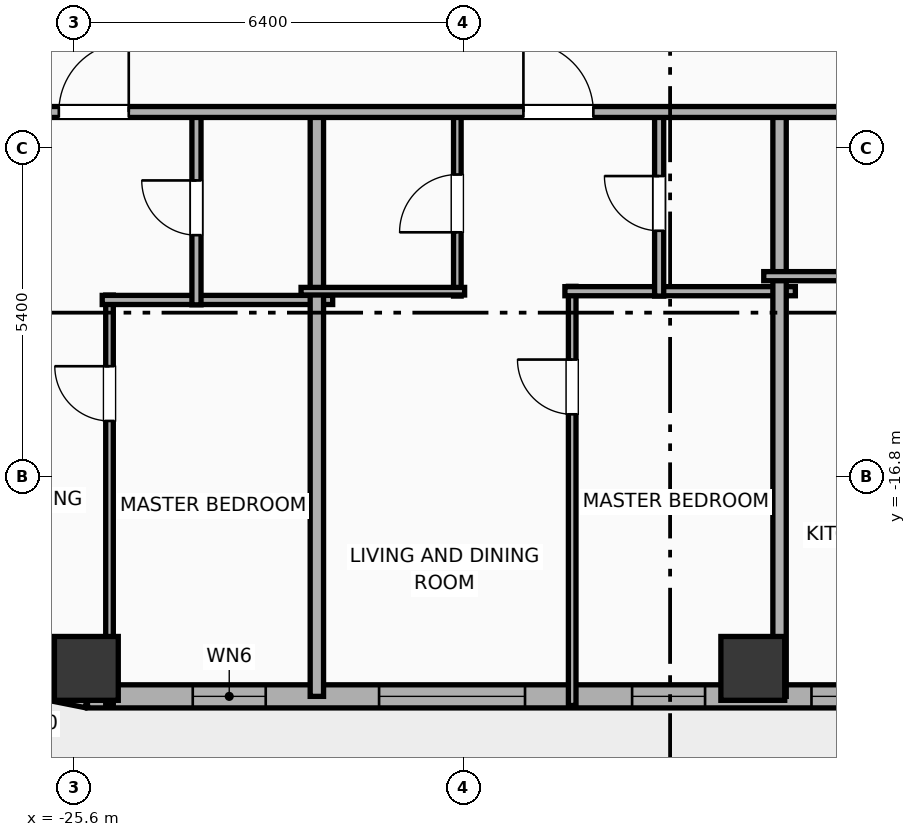
"""IFC4 building model, lengths in metres.
Left out: names, types, materials, properties, quantities, classifications, styles, units other than length and angle.
Written with IfcOpenShell. Run it as: python <this file> out.ifc"""

import sys

from ifc_helpers import new_model, si_unit, direction, frame, frame_2d, origin, origin_2d, place, context, subcontext, project, spatial, rectangle, hollow_rectangle, extrude, element, fill, save


model = new_model("IFC4")
c1 = context("Model", 3, precision=1e-05, world=origin(), true_north=direction((0.0, 1.0)))
c2 = subcontext(c1, "Body", "Model", "MODEL_VIEW")
j1 = project(units=[si_unit("LENGTHUNIT", "METRE"), si_unit("PLANEANGLEUNIT", "RADIAN")], contexts=[c1])
p1 = place(None, origin())
s1 = spatial("IfcSite", under=j1, at=p1, CompositionType="ELEMENT")
p2 = place(p1, origin())
s2 = spatial("IfcBuilding", under=s1, at=p2, CompositionType="ELEMENT")
p3 = place(p2, frame((0.0, 0.0, 85.8)))
s3 = spatial("IfcBuildingStorey", under=s2, at=p3, CompositionType="ELEMENT", Elevation=85.8)
for number, where, z_axis, x_axis in (
    (1, (-25.4, -19.95, -0.4), (0.0, 0.0, 1.0), (1.0, 0.0, 0.0)),
    (2, (-14.44, -19.95, -0.4), (0.0, 0.0, 1.0), (1.0, 0.0, 0.0)),
):
    element("IfcColumn", number, at=place(p3, frame(where, z_axis=z_axis, x_axis=x_axis)), inside=s3, PredefinedType="COLUMN", context=c2, shape_type="SweptSolid", body=[
        extrude(hollow_rectangle(XDim=1.05, YDim=1.05, WallThickness=0.036, at=origin_2d()), origin(), (0.0, 0.0, 1.0), 4.3),
    ])
p4 = place(p3, frame((29.381, -20.41, 0.0), z_axis=(0.0, 0.0, 1.0), x_axis=(-1.0, 0.0, 0.0)))
e3 = element("IfcWall", 3, at=p4, inside=s3, PredefinedType="ELEMENTEDWALL", context=c2, shape_type="SweptSolid", body=[
    extrude(rectangle(XDim=54.763, YDim=0.38, at=frame_2d((27.381, 0.0))), origin(), (0.0, 0.0, 1.0), 2.54),
])
p5 = place(p4, frame((18.486, 0.0, 0.75)))
e4 = element("IfcOpeningElement", 4, at=p5, cuts=e3, PredefinedType="OPENING", context=c2, shape_type="SweptSolid", body=[
    extrude(rectangle(XDim=2.4, YDim=1.45, at=frame_2d((1.2, 0.725))), frame((0.0, 0.2, 0.0), z_axis=(0.0, -1.0, 0.0), x_axis=(1.0, 0.0, 0.0)), (0.0, 0.0, 1.0), 0.4),
])
p6 = place(p4, frame((47.567, 0.0, 0.75)))
e5 = element("IfcOpeningElement", 5, at=p6, cuts=e3, PredefinedType="OPENING", context=c2, shape_type="SweptSolid", body=[
    extrude(rectangle(XDim=2.4, YDim=1.45, at=frame_2d((1.2, 0.725))), frame((0.0, 0.2, 0.0), z_axis=(0.0, -1.0, 0.0), x_axis=(1.0, 0.0, 0.0)), (0.0, 0.0, 1.0), 0.4),
])
p7 = place(p4, frame((7.464, 0.0, 0.0)))
e6 = element("IfcOpeningElement", 6, at=p7, cuts=e3, PredefinedType="OPENING", context=c2, shape_type="SweptSolid", body=[
    extrude(rectangle(XDim=1.5, YDim=2.05, at=frame_2d((0.75, 1.025))), frame((0.0, 0.2, 0.0), z_axis=(0.0, -1.0, 0.0), x_axis=(1.0, 0.0, 0.0)), (0.0, 0.0, 1.0), 0.4),
])
p8 = place(p4, frame((51.831, 0.0, 0.55)))
e7 = element("IfcOpeningElement", 7, at=p8, cuts=e3, PredefinedType="OPENING", context=c2, shape_type="SweptSolid", body=[
    extrude(rectangle(XDim=1.2, YDim=1.15, at=frame_2d((0.6, 0.575))), frame((0.0, 0.2, 0.0), z_axis=(0.0, -1.0, 0.0), x_axis=(1.0, 0.0, 0.0)), (0.0, 0.0, 1.0), 0.4),
])
p9 = place(p4, frame((44.606, 0.0, 0.55)))
e8 = element("IfcOpeningElement", 8, at=p9, cuts=e3, PredefinedType="OPENING", context=c2, shape_type="SweptSolid", body=[
    extrude(rectangle(XDim=1.2, YDim=1.15, at=frame_2d((0.6, 0.575))), frame((0.0, 0.2, 0.0), z_axis=(0.0, -1.0, 0.0), x_axis=(1.0, 0.0, 0.0)), (0.0, 0.0, 1.0), 0.4),
])
p10 = place(p4, frame((38.906, 0.0, 0.55)))
e9 = element("IfcOpeningElement", 9, at=p10, cuts=e3, PredefinedType="OPENING", context=c2, shape_type="SweptSolid", body=[
    extrude(rectangle(XDim=1.2, YDim=1.15, at=frame_2d((0.6, 0.575))), frame((0.0, 0.2, 0.0), z_axis=(0.0, -1.0, 0.0), x_axis=(1.0, 0.0, 0.0)), (0.0, 0.0, 1.0), 0.4),
])
p11 = place(p4, frame((41.656, 0.0, 0.55)))
e10 = element("IfcOpeningElement", 10, at=p11, cuts=e3, PredefinedType="OPENING", context=c2, shape_type="SweptSolid", body=[
    extrude(rectangle(XDim=1.2, YDim=1.15, at=frame_2d((0.6, 0.575))), frame((0.0, 0.2, 0.0), z_axis=(0.0, -1.0, 0.0), x_axis=(1.0, 0.0, 0.0)), (0.0, 0.0, 1.0), 0.4),
])
p12 = place(p4, frame((33.666, 0.0, 0.55)))
e11 = element("IfcOpeningElement", 11, at=p12, cuts=e3, PredefinedType="OPENING", context=c2, shape_type="SweptSolid", body=[
    extrude(rectangle(XDim=1.2, YDim=1.15, at=frame_2d((0.6, 0.575))), frame((0.0, 0.2, 0.0), z_axis=(0.0, -1.0, 0.0), x_axis=(1.0, 0.0, 0.0)), (0.0, 0.0, 1.0), 0.4),
])
p13 = place(p4, frame((36.176, 0.0, 0.55)))
e12 = element("IfcOpeningElement", 12, at=p13, cuts=e3, PredefinedType="OPENING", context=c2, shape_type="SweptSolid", body=[
    extrude(rectangle(XDim=1.2, YDim=1.15, at=frame_2d((0.6, 0.575))), frame((0.0, 0.2, 0.0), z_axis=(0.0, -1.0, 0.0), x_axis=(1.0, 0.0, 0.0)), (0.0, 0.0, 1.0), 0.4),
])
p14 = place(p4, frame((27.861, 0.0, 0.55)))
e13 = element("IfcOpeningElement", 13, at=p14, cuts=e3, PredefinedType="OPENING", context=c2, shape_type="SweptSolid", body=[
    extrude(rectangle(XDim=1.2, YDim=1.15, at=frame_2d((0.6, 0.575))), frame((0.0, 0.2, 0.0), z_axis=(0.0, -1.0, 0.0), x_axis=(1.0, 0.0, 0.0)), (0.0, 0.0, 1.0), 0.4),
])
p15 = place(p4, frame((30.611, 0.0, 0.55)))
e14 = element("IfcOpeningElement", 14, at=p15, cuts=e3, PredefinedType="OPENING", context=c2, shape_type="SweptSolid", body=[
    extrude(rectangle(XDim=1.2, YDim=1.15, at=frame_2d((0.6, 0.575))), frame((0.0, 0.2, 0.0), z_axis=(0.0, -1.0, 0.0), x_axis=(1.0, 0.0, 0.0)), (0.0, 0.0, 1.0), 0.4),
])
p16 = place(p4, frame((23.531, 0.0, 0.55)))
e15 = element("IfcOpeningElement", 15, at=p16, cuts=e3, PredefinedType="OPENING", context=c2, shape_type="SweptSolid", body=[
    extrude(rectangle(XDim=1.2, YDim=1.15, at=frame_2d((0.6, 0.575))), frame((0.0, 0.2, 0.0), z_axis=(0.0, -1.0, 0.0), x_axis=(1.0, 0.0, 0.0)), (0.0, 0.0, 1.0), 0.4),
])
p17 = place(p4, frame((16.386, 0.0, 0.55)))
e16 = element("IfcOpeningElement", 16, at=p17, cuts=e3, PredefinedType="OPENING", context=c2, shape_type="SweptSolid", body=[
    extrude(rectangle(XDim=1.2, YDim=1.15, at=frame_2d((0.6, 0.575))), frame((0.0, 0.2, 0.0), z_axis=(0.0, -1.0, 0.0), x_axis=(1.0, 0.0, 0.0)), (0.0, 0.0, 1.0), 0.4),
])
p18 = place(p4, frame((12.531, 0.0, 0.55)))
e17 = element("IfcOpeningElement", 17, at=p18, cuts=e3, PredefinedType="OPENING", context=c2, shape_type="SweptSolid", body=[
    extrude(rectangle(XDim=1.2, YDim=1.15, at=frame_2d((0.6, 0.575))), frame((0.0, 0.2, 0.0), z_axis=(0.0, -1.0, 0.0), x_axis=(1.0, 0.0, 0.0)), (0.0, 0.0, 1.0), 0.4),
])
p19 = place(p4, frame((4.377, 0.0, 0.55)))
e18 = element("IfcOpeningElement", 18, at=p19, cuts=e3, PredefinedType="OPENING", context=c2, shape_type="SweptSolid", body=[
    extrude(rectangle(XDim=1.2, YDim=1.15, at=frame_2d((0.6, 0.575))), frame((0.0, 0.2, 0.0), z_axis=(0.0, -1.0, 0.0), x_axis=(1.0, 0.0, 0.0)), (0.0, 0.0, 1.0), 0.4),
])
p20 = place(p4, frame((1.481, 0.0, 0.55)))
e19 = element("IfcOpeningElement", 19, at=p20, cuts=e3, PredefinedType="OPENING", context=c2, shape_type="SweptSolid", body=[
    extrude(rectangle(XDim=1.2, YDim=1.15, at=frame_2d((0.6, 0.575))), frame((0.0, 0.2, 0.0), z_axis=(0.0, -1.0, 0.0), x_axis=(1.0, 0.0, 0.0)), (0.0, 0.0, 1.0), 0.4),
])
p21 = place(p3, frame((-25.381, -20.41, 0.0), z_axis=(0.0, 0.0, 1.0), x_axis=(-0.980786132421, 0.195086038585, 0.0)))
e20 = element("IfcWall", 20, at=p21, inside=s3, PredefinedType="ELEMENTEDWALL", context=c2, shape_type="SweptSolid", body=[
    extrude(rectangle(XDim=1.504, YDim=0.38, at=frame_2d((0.752, 0.0))), origin(), (0.0, 0.0, 1.0), 2.54),
])
p22 = place(p21, frame((0.732, 0.0, 0.55)))
e21 = element("IfcOpeningElement", 21, at=p22, cuts=e20, PredefinedType="OPENING", context=c2, shape_type="SweptSolid", body=[
    extrude(rectangle(XDim=0.52, YDim=1.15, at=frame_2d((0.26, 0.575))), frame((0.0, 0.2, 0.0), z_axis=(0.0, -1.0, 0.0), x_axis=(1.0, 0.0, 0.0)), (0.0, 0.0, 1.0), 0.4),
])
p23 = place(p3, frame((-25.019, -20.56, 0.0), z_axis=(0.0, 0.0, 1.0), x_axis=(0.0, 1.0, 0.0)))
e22 = element("IfcWall", 22, at=p23, inside=s3, PredefinedType="PARTITIONING", context=c2, shape_type="SweptSolid", body=[
    extrude(rectangle(XDim=6.749, YDim=0.125, at=frame_2d((3.375, 0.0))), origin(), (0.0, 0.0, 1.0), 3.65),
])
p24 = place(p23, frame((4.679, 0.0, 0.0)))
e23 = element("IfcOpeningElement", 23, at=p24, cuts=e22, PredefinedType="OPENING", context=c2, shape_type="SweptSolid", body=[
    extrude(rectangle(XDim=0.9, YDim=2.05, at=frame_2d((0.45, 1.025))), frame((0.0, 0.073, 0.0), z_axis=(0.0, -1.0, 0.0), x_axis=(1.0, 0.0, 0.0)), (0.0, 0.0, 1.0), 0.145),
])
p25 = place(p3, frame((-25.139, -13.891, 0.0), z_axis=(0.0, 0.0, 1.0), x_axis=(1.0, 0.0, 0.0)))
e24 = element("IfcWall", 24, at=p25, inside=s3, PredefinedType="PLUMBINGWALL", context=c2, shape_type="SweptSolid", body=[
    extrude(rectangle(XDim=3.79, YDim=0.15, at=frame_2d((1.895, 0.0))), origin(), (0.0, 0.0, 1.0), 3.65),
])
p26 = place(p3, frame((-23.589, -13.971, 0.0), z_axis=(0.0, 0.0, 1.0), x_axis=(0.0, 1.0, 0.0)))
e25 = element("IfcWall", 25, at=p26, inside=s3, PredefinedType="PLUMBINGWALL", context=c2, shape_type="SweptSolid", body=[
    extrude(rectangle(XDim=3.191, YDim=0.15, at=frame_2d((1.595, 0.0))), origin(), (0.0, 0.0, 1.0), 3.65),
])
p27 = place(p26, frame((1.146, 0.0, 0.0)))
e26 = element("IfcOpeningElement", 26, at=p27, cuts=e25, PredefinedType="OPENING", context=c2, shape_type="SweptSolid", body=[
    extrude(rectangle(XDim=0.9, YDim=2.05, at=frame_2d((0.45, 1.025))), frame((0.0, 0.085, 0.0), z_axis=(0.0, -1.0, 0.0), x_axis=(1.0, 0.0, 0.0)), (0.0, 0.0, 1.0), 0.17),
])
p28 = place(p3, frame((-21.609, -20.41, 0.0), z_axis=(0.0, 0.0, 1.0), x_axis=(0.0, 1.0, 0.0)))
e27 = element("IfcWall", 27, at=p28, inside=s3, PredefinedType="PARTITIONING", context=c2, shape_type="SweptSolid", body=[
    extrude(rectangle(XDim=9.69, YDim=0.22, at=frame_2d((4.845, 0.0))), origin(), (0.0, 0.0, 1.0), 3.65),
])
p29 = place(p3, frame((-17.41, -20.56, 0.0), z_axis=(0.0, 0.0, 1.0), x_axis=(0.0, 1.0, 0.0)))
e28 = element("IfcWall", 28, at=p29, inside=s3, PredefinedType="PARTITIONING", context=c2, shape_type="SweptSolid", body=[
    extrude(rectangle(XDim=6.893, YDim=0.125, at=frame_2d((3.447, 0.0))), origin(), (0.0, 0.0, 1.0), 3.65),
])
p30 = place(p29, frame((4.789, 0.0, 0.0)))
e29 = element("IfcOpeningElement", 29, at=p30, cuts=e28, PredefinedType="OPENING", context=c2, shape_type="SweptSolid", body=[
    extrude(rectangle(XDim=0.9, YDim=2.05, at=frame_2d((0.45, 1.025))), frame((0.0, 0.073, 0.0), z_axis=(0.0, -1.0, 0.0), x_axis=(1.0, 0.0, 0.0)), (0.0, 0.0, 1.0), 0.145),
])
p31 = place(p3, frame((-17.53, -13.747, 0.0), z_axis=(0.0, 0.0, 1.0), x_axis=(1.0, 0.0, 0.0)))
e30 = element("IfcWall", 30, at=p31, inside=s3, PredefinedType="PLUMBINGWALL", context=c2, shape_type="SweptSolid", body=[
    extrude(rectangle(XDim=3.79, YDim=0.15, at=frame_2d((1.895, 0.0))), origin(), (0.0, 0.0, 1.0), 3.65),
])
p32 = place(p3, frame((-19.299, -13.827, 0.0), z_axis=(0.0, 0.0, 1.0), x_axis=(0.0, 1.0, 0.0)))
e31 = element("IfcWall", 31, at=p32, inside=s3, PredefinedType="PARTITIONING", context=c2, shape_type="SweptSolid", body=[
    extrude(rectangle(XDim=3.047, YDim=0.125, at=frame_2d((1.523, 0.0))), origin(), (0.0, 0.0, 1.0), 3.65),
])
p33 = place(p32, frame((1.049, 0.0, 0.0)))
e32 = element("IfcOpeningElement", 32, at=p33, cuts=e31, PredefinedType="OPENING", context=c2, shape_type="SweptSolid", body=[
    extrude(rectangle(XDim=0.95, YDim=2.05, at=frame_2d((0.475, 1.025))), frame((0.0, 0.073, 0.0), z_axis=(0.0, -1.0, 0.0), x_axis=(1.0, 0.0, 0.0)), (0.0, 0.0, 1.0), 0.145),
])
p34 = place(p3, frame((-21.869, -13.747, 0.0), z_axis=(0.0, 0.0, 1.0), x_axis=(1.0, 0.0, 0.0)))
e33 = element("IfcWall", 33, at=p34, inside=s3, PredefinedType="PARTITIONING", context=c2, shape_type="SweptSolid", body=[
    extrude(rectangle(XDim=2.69, YDim=0.125, at=frame_2d((1.345, 0.0))), origin(), (0.0, 0.0, 1.0), 3.65),
])
p35 = place(p3, frame((-15.98, -13.827, 0.0), z_axis=(0.0, 0.0, 1.0), x_axis=(0.0, 1.0, 0.0)))
e34 = element("IfcWall", 34, at=p35, inside=s3, PredefinedType="PLUMBINGWALL", context=c2, shape_type="SweptSolid", body=[
    extrude(rectangle(XDim=3.047, YDim=0.15, at=frame_2d((1.523, 0.0))), origin(), (0.0, 0.0, 1.0), 3.65),
])
p36 = place(p35, frame((1.073, 0.0, 0.0)))
e35 = element("IfcOpeningElement", 35, at=p36, cuts=e34, PredefinedType="OPENING", context=c2, shape_type="SweptSolid", body=[
    extrude(rectangle(XDim=0.9, YDim=2.05, at=frame_2d((0.45, 1.025))), frame((0.0, 0.085, 0.0), z_axis=(0.0, -1.0, 0.0), x_axis=(1.0, 0.0, 0.0)), (0.0, 0.0, 1.0), 0.17),
])
p37 = place(p3, frame((-14.0, -20.41, 0.0), z_axis=(0.0, 0.0, 1.0), x_axis=(0.0, 1.0, 0.0)))
e36 = element("IfcWall", 36, at=p37, inside=s3, PredefinedType="PARTITIONING", context=c2, shape_type="SweptSolid", body=[
    extrude(rectangle(XDim=9.69, YDim=0.22, at=frame_2d((4.845, 0.0))), origin(), (0.0, 0.0, 1.0), 2.54),
])
p38 = place(p3, frame((-14.26, -13.5, 0.0), z_axis=(0.0, 0.0, 1.0), x_axis=(1.0, 0.0, 0.0)))
e37 = element("IfcWall", 37, at=p38, inside=s3, PredefinedType="PLUMBINGWALL", context=c2, shape_type="SweptSolid", body=[
    extrude(rectangle(XDim=2.59, YDim=0.15, at=frame_2d((1.295, 0.0))), origin(), (0.0, 0.0, 1.0), 3.65),
])
p39 = place(p3, frame((-29.21, -10.8, 0.0), z_axis=(0.0, 0.0, 1.0), x_axis=(1.0, 0.0, 0.0)))
e38 = element("IfcWall", 38, at=p39, inside=s3, PredefinedType="PARTITIONING", context=c2, shape_type="SweptSolid", body=[
    extrude(rectangle(XDim=62.42, YDim=0.18, at=frame_2d((31.21, 0.0))), origin(), (0.0, 0.0, 1.0), 3.65),
])
p40 = place(p39, frame((3.357, 0.0, 0.0)))
e39 = element("IfcOpeningElement", 39, at=p40, cuts=e38, PredefinedType="OPENING", context=c2, shape_type="SweptSolid", body=[
    extrude(rectangle(XDim=1.15, YDim=2.05, at=frame_2d((0.575, 1.025))), frame((0.0, 0.1, 0.0), z_axis=(0.0, -1.0, 0.0), x_axis=(1.0, 0.0, 0.0)), (0.0, 0.0, 1.0), 0.2),
])
p41 = place(p39, frame((10.998, 0.0, 0.0)))
e40 = element("IfcOpeningElement", 40, at=p41, cuts=e38, PredefinedType="OPENING", context=c2, shape_type="SweptSolid", body=[
    extrude(rectangle(XDim=1.15, YDim=2.05, at=frame_2d((0.575, 1.025))), frame((0.0, 0.1, 0.0), z_axis=(0.0, -1.0, 0.0), x_axis=(1.0, 0.0, 0.0)), (0.0, 0.0, 1.0), 0.2),
])
p42 = place(p39, frame((18.482, 0.0, 0.0)))
e41 = element("IfcOpeningElement", 41, at=p42, cuts=e38, PredefinedType="OPENING", context=c2, shape_type="SweptSolid", body=[
    extrude(rectangle(XDim=1.15, YDim=2.05, at=frame_2d((0.575, 1.025))), frame((0.0, 0.1, 0.0), z_axis=(0.0, -1.0, 0.0), x_axis=(1.0, 0.0, 0.0)), (0.0, 0.0, 1.0), 0.2),
])
p43 = place(p39, frame((23.962, 0.0, 0.0)))
e42 = element("IfcOpeningElement", 42, at=p43, cuts=e38, PredefinedType="OPENING", context=c2, shape_type="SweptSolid", body=[
    extrude(rectangle(XDim=1.15, YDim=2.05, at=frame_2d((0.575, 1.025))), frame((0.0, 0.1, 0.0), z_axis=(0.0, -1.0, 0.0), x_axis=(1.0, 0.0, 0.0)), (0.0, 0.0, 1.0), 0.2),
])
p44 = place(p39, frame((29.524, 0.0, 0.0)))
e43 = element("IfcOpeningElement", 43, at=p44, cuts=e38, PredefinedType="OPENING", context=c2, shape_type="SweptSolid", body=[
    extrude(rectangle(XDim=1.15, YDim=2.05, at=frame_2d((0.575, 1.025))), frame((0.0, 0.1, 0.0), z_axis=(0.0, -1.0, 0.0), x_axis=(1.0, 0.0, 0.0)), (0.0, 0.0, 1.0), 0.2),
])
p45 = place(p39, frame((34.218, 0.0, 0.0)))
e44 = element("IfcOpeningElement", 44, at=p45, cuts=e38, PredefinedType="OPENING", context=c2, shape_type="SweptSolid", body=[
    extrude(rectangle(XDim=0.9, YDim=2.05, at=frame_2d((0.45, 1.025))), frame((0.0, 0.1, 0.0), z_axis=(0.0, -1.0, 0.0), x_axis=(1.0, 0.0, 0.0)), (0.0, 0.0, 1.0), 0.2),
])
p46 = place(p39, frame((38.313, 0.0, 0.0)))
e45 = element("IfcOpeningElement", 45, at=p46, cuts=e38, PredefinedType="OPENING", context=c2, shape_type="SweptSolid", body=[
    extrude(rectangle(XDim=1.15, YDim=2.05, at=frame_2d((0.575, 1.025))), frame((0.0, 0.1, 0.0), z_axis=(0.0, -1.0, 0.0), x_axis=(1.0, 0.0, 0.0)), (0.0, 0.0, 1.0), 0.2),
])
p47 = place(p39, frame((45.223, 0.0, 0.0)))
e46 = element("IfcOpeningElement", 46, at=p47, cuts=e38, PredefinedType="OPENING", context=c2, shape_type="SweptSolid", body=[
    extrude(rectangle(XDim=0.9, YDim=2.05, at=frame_2d((0.45, 1.025))), frame((0.0, 0.1, 0.0), z_axis=(0.0, -1.0, 0.0), x_axis=(1.0, 0.0, 0.0)), (0.0, 0.0, 1.0), 0.2),
])
p48 = place(p39, frame((51.352, 0.0, 0.0)))
e47 = element("IfcOpeningElement", 47, at=p48, cuts=e38, PredefinedType="OPENING", context=c2, shape_type="SweptSolid", body=[
    extrude(rectangle(XDim=1.15, YDim=2.05, at=frame_2d((0.575, 1.025))), frame((0.0, 0.1, 0.0), z_axis=(0.0, -1.0, 0.0), x_axis=(1.0, 0.0, 0.0)), (0.0, 0.0, 1.0), 0.2),
])
p49 = place(p39, frame((58.493, 0.0, 0.0)))
e48 = element("IfcOpeningElement", 48, at=p49, cuts=e38, PredefinedType="OPENING", context=c2, shape_type="SweptSolid", body=[
    extrude(rectangle(XDim=1.15, YDim=2.05, at=frame_2d((0.575, 1.025))), frame((0.0, 0.1, 0.0), z_axis=(0.0, -1.0, 0.0), x_axis=(1.0, 0.0, 0.0)), (0.0, 0.0, 1.0), 0.2),
])
p50 = place(p6, origin())
e49 = element("IfcWindow", 49, at=p50, inside=s3, PartitioningType="SINGLE_PANEL", PredefinedType="WINDOW", context=c2, shape_type="SweptSolid", body=[
    extrude(rectangle(XDim=2.4, YDim=1.45, at=frame_2d((1.2, 0.725))), frame((0.0, 0.03, 0.0), z_axis=(0.0, -1.0, 0.0), x_axis=(1.0, 0.0, 0.0)), (0.0, 0.0, 1.0), 0.06),
])
fill(e5, e49)
p51 = place(p8, origin())
e50 = element("IfcWindow", 50, at=p51, inside=s3, PartitioningType="SINGLE_PANEL", PredefinedType="WINDOW", context=c2, shape_type="SweptSolid", body=[
    extrude(rectangle(XDim=1.2, YDim=1.15, at=frame_2d((0.6, 0.575))), frame((0.0, 0.03, 0.0), z_axis=(0.0, -1.0, 0.0), x_axis=(1.0, 0.0, 0.0)), (0.0, 0.0, 1.0), 0.06),
])
fill(e7, e50)
p52 = place(p9, origin())
e51 = element("IfcWindow", 51, at=p52, inside=s3, PartitioningType="SINGLE_PANEL", PredefinedType="WINDOW", context=c2, shape_type="SweptSolid", body=[
    extrude(rectangle(XDim=1.2, YDim=1.15, at=frame_2d((0.6, 0.575))), frame((0.0, 0.03, 0.0), z_axis=(0.0, -1.0, 0.0), x_axis=(1.0, 0.0, 0.0)), (0.0, 0.0, 1.0), 0.06),
])
fill(e8, e51)
p53 = place(p11, origin())
e52 = element("IfcWindow", 52, at=p53, inside=s3, PartitioningType="SINGLE_PANEL", PredefinedType="WINDOW", context=c2, shape_type="SweptSolid", body=[
    extrude(rectangle(XDim=1.2, YDim=1.15, at=frame_2d((0.6, 0.575))), frame((0.0, 0.03, 0.0), z_axis=(0.0, -1.0, 0.0), x_axis=(1.0, 0.0, 0.0)), (0.0, 0.0, 1.0), 0.06),
])
fill(e10, e52)
p54 = place(p24, origin())
e53 = element("IfcDoor", 53, at=p54, inside=s3, OperationType="SINGLE_SWING_RIGHT", PredefinedType="DOOR", context=c2, shape_type="SweptSolid", body=[
    extrude(rectangle(XDim=0.9, YDim=2.05, at=frame_2d((0.45, 1.025))), frame((0.0, 0.025, 0.0), z_axis=(0.0, -1.0, 0.0), x_axis=(1.0, 0.0, 0.0)), (0.0, 0.0, 1.0), 0.05),
])
fill(e23, e53)
p55 = place(p27, origin())
e54 = element("IfcDoor", 54, at=p55, inside=s3, OperationType="SINGLE_SWING_RIGHT", PredefinedType="DOOR", context=c2, shape_type="SweptSolid", body=[
    extrude(rectangle(XDim=0.9, YDim=2.05, at=frame_2d((0.45, 1.025))), frame((0.0, 0.025, 0.0), z_axis=(0.0, -1.0, 0.0), x_axis=(1.0, 0.0, 0.0)), (0.0, 0.0, 1.0), 0.05),
])
fill(e26, e54)
p56 = place(p30, origin())
e55 = element("IfcDoor", 55, at=p56, inside=s3, OperationType="SINGLE_SWING_RIGHT", PredefinedType="DOOR", context=c2, shape_type="SweptSolid", body=[
    extrude(rectangle(XDim=0.9, YDim=2.05, at=frame_2d((0.45, 1.025))), frame((0.0, 0.025, 0.0), z_axis=(0.0, -1.0, 0.0), x_axis=(1.0, 0.0, 0.0)), (0.0, 0.0, 1.0), 0.05),
])
fill(e29, e55)
p57 = place(p33, origin())
e56 = element("IfcDoor", 56, at=p57, inside=s3, OperationType="SINGLE_SWING_LEFT", PredefinedType="DOOR", context=c2, shape_type="SweptSolid", body=[
    extrude(rectangle(XDim=0.95, YDim=2.05, at=frame_2d((0.475, 1.025))), frame((0.0, 0.025, 0.0), z_axis=(0.0, -1.0, 0.0), x_axis=(1.0, 0.0, 0.0)), (0.0, 0.0, 1.0), 0.05),
])
fill(e32, e56)
p58 = place(p36, origin())
e57 = element("IfcDoor", 57, at=p58, inside=s3, OperationType="SINGLE_SWING_RIGHT", PredefinedType="DOOR", context=c2, shape_type="SweptSolid", body=[
    extrude(rectangle(XDim=0.9, YDim=2.05, at=frame_2d((0.45, 1.025))), frame((0.0, 0.025, 0.0), z_axis=(0.0, -1.0, 0.0), x_axis=(1.0, 0.0, 0.0)), (0.0, 0.0, 1.0), 0.05),
])
fill(e35, e57)
p59 = place(p40, origin())
e58 = element("IfcDoor", 58, at=p59, inside=s3, OperationType="SINGLE_SWING_RIGHT", PredefinedType="DOOR", context=c2, shape_type="SweptSolid", body=[
    extrude(rectangle(XDim=1.15, YDim=2.05, at=frame_2d((0.575, 1.025))), frame((0.0, 0.025, 0.0), z_axis=(0.0, -1.0, 0.0), x_axis=(1.0, 0.0, 0.0)), (0.0, 0.0, 1.0), 0.05),
])
fill(e39, e58)
p60 = place(p41, origin())
e59 = element("IfcDoor", 59, at=p60, inside=s3, OperationType="SINGLE_SWING_LEFT", PredefinedType="DOOR", context=c2, shape_type="SweptSolid", body=[
    extrude(rectangle(XDim=1.15, YDim=2.05, at=frame_2d((0.575, 1.025))), frame((0.0, 0.025, 0.0), z_axis=(0.0, -1.0, 0.0), x_axis=(1.0, 0.0, 0.0)), (0.0, 0.0, 1.0), 0.05),
])
fill(e40, e59)
save(model, sys.argv[1])
